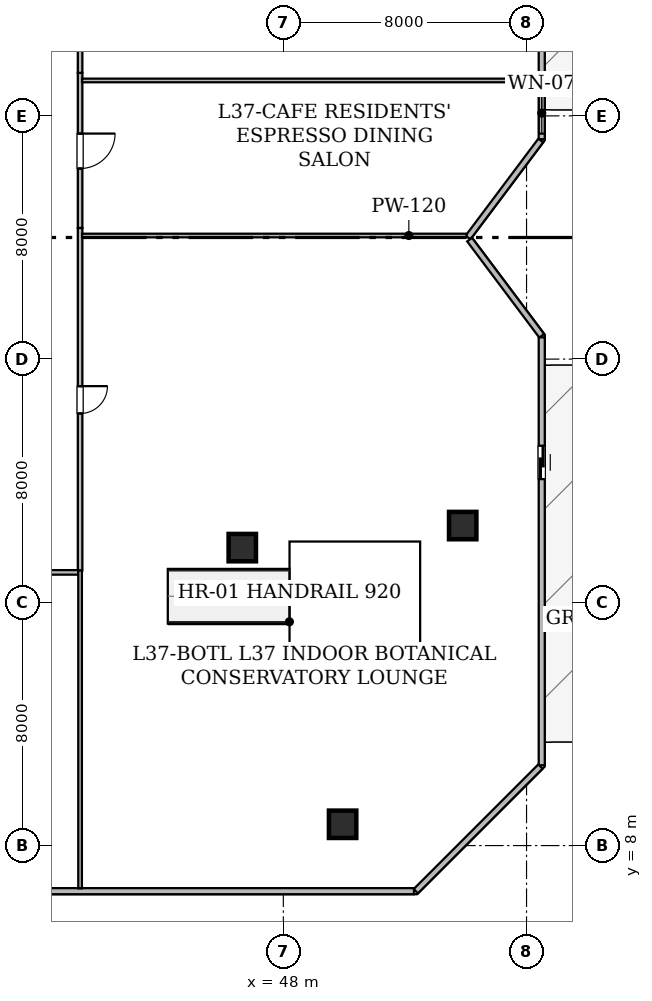
"""IFC4 building model, lengths in metres.
Left out: names, types, materials, properties, quantities, classifications, styles, units other than length and angle.
Written with IfcOpenShell. Run it as: python <this file> out.ifc"""

import sys

from ifc_helpers import new_model, si_unit, direction, frame, frame_2d, origin, origin_2d, place, context, subcontext, project, spatial, rectangle, hollow_rectangle, extrude, element, fill, save


model = new_model("IFC4")
c1 = context("Model", 3, precision=1e-05, world=origin(), true_north=direction((0.0, 1.0)))
c2 = subcontext(c1, "Body", "Model", "MODEL_VIEW")
j1 = project(units=[si_unit("LENGTHUNIT", "METRE"), si_unit("PLANEANGLEUNIT", "RADIAN")], contexts=[c1])
p1 = place(None, origin())
s1 = spatial("IfcSite", under=j1, at=p1, CompositionType="ELEMENT")
p2 = place(p1, origin())
s2 = spatial("IfcBuilding", under=s1, at=p2, CompositionType="ELEMENT")
p3 = place(p2, frame((0.0, 0.0, 145.7)))
s3 = spatial("IfcBuildingStorey", under=s2, at=p3, CompositionType="ELEMENT", Elevation=145.7)
for number, where, z_axis, x_axis in (
    (1, (49.95, 8.7, 0.0), (0.0, 0.0, 1.0), (1.0, 0.0, 0.0)),
    (2, (53.9, 18.525, 0.0), (0.0, 0.0, 1.0), (1.0, 0.0, 0.0)),
    (3, (46.65, 17.8, 0.0), (0.0, 0.0, 1.0), (1.0, 0.0, 0.0)),
):
    element("IfcColumn", number, at=place(p3, frame(where, z_axis=z_axis, x_axis=x_axis)), inside=s3, PredefinedType="COLUMN", context=c2, shape_type="SweptSolid", body=[
        extrude(hollow_rectangle(XDim=0.9, YDim=0.9, WallThickness=0.045, at=origin_2d()), origin(), (0.0, 0.0, 1.0), 4.8),
    ])
p4 = place(p3, frame((56.5, 45.296, 0.0), z_axis=(0.0, 0.0, 1.0), x_axis=(0.0, -1.0, 0.0)))
e4 = element("IfcWall", 4, at=p4, inside=s3, PredefinedType="STANDARD", context=c2, shape_type="SweptSolid", body=[
    extrude(rectangle(XDim=14.063, YDim=0.2, at=frame_2d((7.031, 0.0))), origin(), (0.0, 0.0, 1.0), 4.48),
])
p5 = place(p4, frame((3.443, 0.0, 0.0)))
e5 = element("IfcOpeningElement", 5, at=p5, cuts=e4, PredefinedType="OPENING", context=c2, shape_type="SweptSolid", body=[
    extrude(rectangle(XDim=1.1, YDim=2.2, at=frame_2d((0.55, 1.1))), frame((0.0, 0.11, 0.0), z_axis=(0.0, -1.0, 0.0), x_axis=(1.0, 0.0, 0.0)), (0.0, 0.0, 1.0), 0.22),
])
p6 = place(p4, frame((12.53, 0.0, 0.85)))
e6 = element("IfcOpeningElement", 6, at=p6, cuts=e4, PredefinedType="OPENING", context=c2, shape_type="SweptSolid", body=[
    extrude(rectangle(XDim=1.35, YDim=1.5, at=frame_2d((0.675, 0.75))), frame((0.0, 0.11, 0.0), z_axis=(0.0, -1.0, 0.0), x_axis=(1.0, 0.0, 0.0)), (0.0, 0.0, 1.0), 0.22),
])
p7 = place(p3, frame((56.469, 31.191, 0.0), z_axis=(0.0, 0.0, 1.0), x_axis=(-0.600137081448, -0.799897170561, 0.0)))
e7 = element("IfcWall", 7, at=p7, inside=s3, PredefinedType="STANDARD", context=c2, shape_type="SweptSolid", body=[
    extrude(rectangle(XDim=3.989, YDim=0.2, at=frame_2d((1.995, 0.0))), origin(), (0.0, 0.0, 1.0), 4.48),
])
p8 = place(p3, frame((54.127, 27.931, 0.0), z_axis=(0.0, 0.0, 1.0), x_axis=(0.600029630681, -0.799977776132, 0.0)))
e8 = element("IfcWall", 8, at=p8, inside=s3, PredefinedType="STANDARD", context=c2, shape_type="SweptSolid", body=[
    extrude(rectangle(XDim=3.955, YDim=0.2, at=frame_2d((1.978, 0.0))), origin(), (0.0, 0.0, 1.0), 4.48),
])
p9 = place(p3, frame((56.5, 24.717, 0.0), z_axis=(0.0, 0.0, 1.0), x_axis=(0.0, -1.0, 0.0)))
e9 = element("IfcWall", 9, at=p9, inside=s3, PredefinedType="STANDARD", context=c2, shape_type="SweptSolid", body=[
    extrude(rectangle(XDim=14.076, YDim=0.2, at=frame_2d((7.038, 0.0))), origin(), (0.0, 0.0, 1.0), 4.48),
])
p10 = place(p9, frame((3.565, 0.0, 0.0)))
e10 = element("IfcOpeningElement", 10, at=p10, cuts=e9, PredefinedType="OPENING", context=c2, shape_type="SweptSolid", body=[
    extrude(rectangle(XDim=1.1, YDim=2.2, at=frame_2d((0.55, 1.1))), frame((0.0, 0.11, 0.0), z_axis=(0.0, -1.0, 0.0), x_axis=(1.0, 0.0, 0.0)), (0.0, 0.0, 1.0), 0.22),
])
p11 = place(p3, frame((56.457, 10.598, 0.0), z_axis=(0.0, 0.0, 1.0), x_axis=(-0.707127843897, -0.707085717849, 0.0)))
e11 = element("IfcWall", 11, at=p11, inside=s3, PredefinedType="STANDARD", context=c2, shape_type="SweptSolid", body=[
    extrude(rectangle(XDim=5.795, YDim=0.2, at=frame_2d((2.898, 0.0))), origin(), (0.0, 0.0, 1.0), 4.48),
])
p12 = place(p3, frame((52.296, 6.5, 0.0), z_axis=(0.0, 0.0, 1.0), x_axis=(-1.0, 0.0, 0.0)))
e12 = element("IfcWall", 12, at=p12, inside=s3, PredefinedType="STANDARD", context=c2, shape_type="SweptSolid", body=[
    extrude(rectangle(XDim=38.593, YDim=0.2, at=frame_2d((19.296, 0.0))), origin(), (0.0, 0.0, 1.0), 4.48),
])
p13 = place(p12, frame((12.808, 0.0, 0.9)))
e13 = element("IfcOpeningElement", 13, at=p13, cuts=e12, PredefinedType="OPENING", context=c2, shape_type="SweptSolid", body=[
    extrude(rectangle(XDim=1.95, YDim=1.65, at=frame_2d((0.975, 0.825))), frame((0.0, 0.11, 0.0), z_axis=(0.0, -1.0, 0.0), x_axis=(1.0, 0.0, 0.0)), (0.0, 0.0, 1.0), 0.22),
])
p14 = place(p3, frame((41.315, 28.314, 0.0), z_axis=(0.0, 0.0, 1.0), x_axis=(0.0, -1.0, 0.0)))
e14 = element("IfcWall", 14, at=p14, inside=s3, PredefinedType="STANDARD", context=c2, shape_type="SweptSolid", body=[
    extrude(rectangle(XDim=11.264, YDim=0.15, at=frame_2d((5.632, 0.0))), origin(), (0.0, 0.0, 1.0), 3.775),
])
p15 = place(p14, frame((5.203, 0.0, 0.0)))
e15 = element("IfcOpeningElement", 15, at=p15, cuts=e14, PredefinedType="OPENING", context=c2, shape_type="SweptSolid", body=[
    extrude(rectangle(XDim=0.9, YDim=2.1, at=frame_2d((0.45, 1.05))), frame((0.0, 0.085, 0.0), z_axis=(0.0, -1.0, 0.0), x_axis=(1.0, 0.0, 0.0)), (0.0, 0.0, 1.0), 0.17),
])
p16 = place(p3, frame((41.315, 33.414, 0.0), z_axis=(0.0, 0.0, 1.0), x_axis=(0.0, -1.0, 0.0)))
e16 = element("IfcWall", 16, at=p16, inside=s3, PredefinedType="STANDARD", context=c2, shape_type="SweptSolid", body=[
    extrude(rectangle(XDim=5.1, YDim=0.15, at=frame_2d((2.55, 0.0))), origin(), (0.0, 0.0, 1.0), 4.48),
])
p17 = place(p16, frame((1.996, 0.0, 0.0)))
e17 = element("IfcOpeningElement", 17, at=p17, cuts=e16, PredefinedType="OPENING", context=c2, shape_type="SweptSolid", body=[
    extrude(rectangle(XDim=1.15, YDim=2.2, at=frame_2d((0.575, 1.1))), frame((0.0, 0.085, 0.0), z_axis=(0.0, -1.0, 0.0), x_axis=(1.0, 0.0, 0.0)), (0.0, 0.0, 1.0), 0.17),
])
p18 = place(p3, frame((41.315, 38.95, 0.0), z_axis=(0.0, 0.0, 1.0), x_axis=(0.0, -1.0, 0.0)))
e18 = element("IfcWall", 18, at=p18, inside=s3, PredefinedType="STANDARD", context=c2, shape_type="SweptSolid", body=[
    extrude(rectangle(XDim=5.536, YDim=0.15, at=frame_2d((2.768, 0.0))), origin(), (0.0, 0.0, 1.0), 3.775),
])
p19 = place(p18, frame((2.318, 0.0, 0.0)))
e19 = element("IfcOpeningElement", 19, at=p19, cuts=e18, PredefinedType="OPENING", context=c2, shape_type="SweptSolid", body=[
    extrude(rectangle(XDim=0.9, YDim=2.1, at=frame_2d((0.45, 1.05))), frame((0.0, 0.085, 0.0), z_axis=(0.0, -1.0, 0.0), x_axis=(1.0, 0.0, 0.0)), (0.0, 0.0, 1.0), 0.17),
])
p20 = place(p3, frame((41.25, 16.985, 0.0), z_axis=(0.0, 0.0, 1.0), x_axis=(-1.0, 0.0, 0.0)))
e20 = element("IfcWall", 20, at=p20, inside=s3, PredefinedType="STANDARD", context=c2, shape_type="SweptSolid", body=[
    extrude(rectangle(XDim=4.736, YDim=0.15, at=frame_2d((2.368, 0.0))), origin(), (0.0, 0.0, 1.0), 3.775),
])
p21 = place(p20, frame((1.918, 0.0, 0.0)))
e21 = element("IfcOpeningElement", 21, at=p21, cuts=e20, PredefinedType="OPENING", context=c2, shape_type="SweptSolid", body=[
    extrude(rectangle(XDim=0.9, YDim=2.1, at=frame_2d((0.45, 1.05))), frame((0.0, 0.085, 0.0), z_axis=(0.0, -1.0, 0.0), x_axis=(1.0, 0.0, 0.0)), (0.0, 0.0, 1.0), 0.17),
])
p22 = place(p3, frame((41.38, 28.065, 0.0), z_axis=(0.0, 0.0, 1.0), x_axis=(1.0, 0.0, 0.0)))
e22 = element("IfcWall", 22, at=p22, inside=s3, PredefinedType="PARTITIONING", context=c2, shape_type="SweptSolid", body=[
    extrude(rectangle(XDim=12.645, YDim=0.12, at=frame_2d((6.323, 0.0))), origin(), (0.0, 0.0, 1.0), 3.775),
])
p23 = place(p3, frame((41.315, 6.592, 0.0), z_axis=(0.0, 0.0, 1.0), x_axis=(0.0, 1.0, 0.0)))
e23 = element("IfcWall", 23, at=p23, inside=s3, PredefinedType="PARTITIONING", context=c2, shape_type="SweptSolid", body=[
    extrude(rectangle(XDim=10.458, YDim=0.12, at=frame_2d((5.229, 0.0))), origin(), (0.0, 0.0, 1.0), 3.926),
])
p24 = place(p3, frame((41.38, 33.165, 0.0), z_axis=(0.0, 0.0, 1.0), x_axis=(1.0, 0.0, 0.0)))
e24 = element("IfcWall", 24, at=p24, inside=s3, PredefinedType="PARTITIONING", context=c2, shape_type="SweptSolid", body=[
    extrude(rectangle(XDim=15.028, YDim=0.12, at=frame_2d((7.514, 0.0))), origin(), (0.0, 0.0, 1.0), 3.775),
])
p25 = place(p10, origin())
e25 = element("IfcDoor", 25, at=p25, inside=s3, OperationType="SLIDING_TO_LEFT", PredefinedType="DOOR", context=c2, shape_type="SweptSolid", body=[
    extrude(rectangle(XDim=1.1, YDim=2.2, at=frame_2d((0.55, 1.1))), frame((0.0, 0.025, 0.0), z_axis=(0.0, -1.0, 0.0), x_axis=(1.0, 0.0, 0.0)), (0.0, 0.0, 1.0), 0.05),
])
fill(e10, e25)
p26 = place(p6, origin())
e26 = element("IfcWindow", 26, at=p26, inside=s3, PartitioningType="SINGLE_PANEL", PredefinedType="WINDOW", context=c2, shape_type="SweptSolid", body=[
    extrude(rectangle(XDim=1.35, YDim=1.5, at=frame_2d((0.675, 0.75))), frame((0.0, 0.03, 0.0), z_axis=(0.0, -1.0, 0.0), x_axis=(1.0, 0.0, 0.0)), (0.0, 0.0, 1.0), 0.06),
])
fill(e6, e26)
p27 = place(p15, origin())
e27 = element("IfcDoor", 27, at=p27, inside=s3, OperationType="SINGLE_SWING_LEFT", PredefinedType="DOOR", context=c2, shape_type="SweptSolid", body=[
    extrude(rectangle(XDim=0.9, YDim=2.1, at=frame_2d((0.45, 1.05))), frame((0.0, 0.025, 0.0), z_axis=(0.0, -1.0, 0.0), x_axis=(1.0, 0.0, 0.0)), (0.0, 0.0, 1.0), 0.05),
])
fill(e15, e27)
p28 = place(p17, origin())
e28 = element("IfcDoor", 28, at=p28, inside=s3, OperationType="SINGLE_SWING_LEFT", PredefinedType="DOOR", context=c2, shape_type="SweptSolid", body=[
    extrude(rectangle(XDim=1.15, YDim=2.2, at=frame_2d((0.575, 1.1))), frame((0.0, 0.025, 0.0), z_axis=(0.0, -1.0, 0.0), x_axis=(1.0, 0.0, 0.0)), (0.0, 0.0, 1.0), 0.05),
])
fill(e17, e28)
save(model, sys.argv[1])
